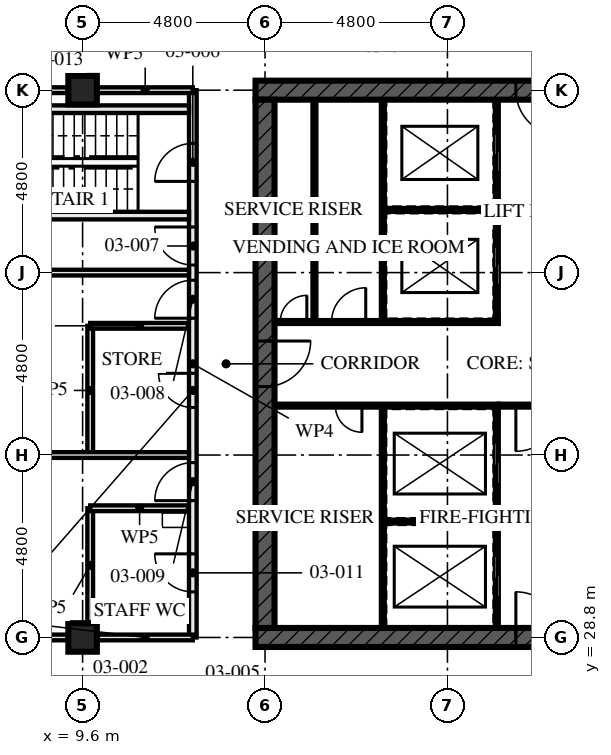
"""IFC4 building model, lengths in metres.
Left out: names, types, materials, properties, quantities, classifications, styles, units other than length and angle.
Written with IfcOpenShell. Run it as: python <this file> out.ifc"""

import sys

from ifc_helpers import new_model, si_unit, direction, frame, frame_2d, origin, origin_2d, place, context, subcontext, project, spatial, rectangle, hollow_rectangle, extrude, element, fill, save


model = new_model("IFC4")
c1 = context("Model", 3, precision=1e-05, world=origin(), true_north=direction((0.0, 1.0)))
c2 = subcontext(c1, "Body", "Model", "MODEL_VIEW")
j1 = project(units=[si_unit("LENGTHUNIT", "METRE"), si_unit("PLANEANGLEUNIT", "RADIAN")], contexts=[c1])
p1 = place(None, origin())
s1 = spatial("IfcSite", under=j1, at=p1, CompositionType="ELEMENT")
p2 = place(p1, origin())
s2 = spatial("IfcBuilding", under=s1, at=p2, CompositionType="ELEMENT")
p3 = place(p2, frame((0.0, 0.0, 13.5)))
s3 = spatial("IfcBuildingStorey", under=s2, at=p3, CompositionType="ELEMENT", Elevation=13.5)
for number, where, z_axis, x_axis in (
    (1, (9.6, 28.8, 0.0), (0.0, 0.0, 1.0), (0.0, 1.0, 0.0)),
    (2, (9.6, 43.2, 0.0), (0.0, 0.0, 1.0), (0.0, 1.0, 0.0)),
):
    element("IfcColumn", number, at=place(p3, frame(where, z_axis=z_axis, x_axis=x_axis)), inside=s3, PredefinedType="COLUMN", context=c2, shape_type="SweptSolid", body=[
        extrude(hollow_rectangle(XDim=0.75, YDim=0.75, WallThickness=0.08, at=origin_2d()), origin(), (0.0, 0.0, 1.0), 4.5),
    ])
p4 = place(p3, frame((14.15, 28.8, -0.17), z_axis=(0.0, 0.0, 1.0), x_axis=(1.0, 0.0, 0.0)))
e3 = element("IfcWall", 3, at=p4, inside=s3, PredefinedType="SHEAR", context=c2, shape_type="SweptSolid", body=[
    extrude(rectangle(XDim=14.9, YDim=0.5, at=frame_2d((7.45, 0.0))), origin(), (0.0, 0.0, 1.0), 4.5),
])
p5 = place(p4, frame((6.85, 0.0, 0.17)))
e4 = element("IfcOpeningElement", 4, at=p5, cuts=e3, PredefinedType="OPENING", context=c2, shape_type="SweptSolid", body=[
    extrude(rectangle(XDim=1.2, YDim=2.1, at=frame_2d((0.6, 1.05))), frame((0.0, 0.26, 0.0), z_axis=(0.0, -1.0, 0.0), x_axis=(1.0, 0.0, 0.0)), (0.0, 0.0, 1.0), 0.521),
])
p6 = place(p3, frame((29.05, 43.2, -0.17), z_axis=(0.0, 0.0, 1.0), x_axis=(-1.0, 0.0, 0.0)))
e5 = element("IfcWall", 5, at=p6, inside=s3, PredefinedType="SHEAR", context=c2, shape_type="SweptSolid", body=[
    extrude(rectangle(XDim=14.9, YDim=0.5, at=frame_2d((7.45, 0.0))), origin(), (0.0, 0.0, 1.0), 4.5),
])
p7 = place(p6, frame((6.85, 0.0, 0.17)))
e6 = element("IfcOpeningElement", 6, at=p7, cuts=e5, PredefinedType="OPENING", context=c2, shape_type="SweptSolid", body=[
    extrude(rectangle(XDim=1.2, YDim=2.1, at=frame_2d((0.6, 1.05))), frame((0.0, 0.26, 0.0), z_axis=(0.0, -1.0, 0.0), x_axis=(1.0, 0.0, 0.0)), (0.0, 0.0, 1.0), 0.521),
])
p8 = place(p3, frame((14.4, 42.95, -0.17), z_axis=(0.0, 0.0, 1.0), x_axis=(0.0, -1.0, 0.0)))
e7 = element("IfcWall", 7, at=p8, inside=s3, PredefinedType="SHEAR", context=c2, shape_type="SweptSolid", body=[
    extrude(rectangle(XDim=13.9, YDim=0.5, at=frame_2d((6.95, 0.0))), origin(), (0.0, 0.0, 1.0), 4.5),
])
p9 = place(p8, frame((6.35, 0.0, 0.17)))
e8 = element("IfcOpeningElement", 8, at=p9, cuts=e7, PredefinedType="OPENING", context=c2, shape_type="SweptSolid", body=[
    extrude(rectangle(XDim=1.2, YDim=2.1, at=frame_2d((0.6, 1.05))), frame((0.0, 0.26, 0.0), z_axis=(0.0, -1.0, 0.0), x_axis=(1.0, 0.0, 0.0)), (0.0, 0.0, 1.0), 0.521),
])
for number, where, z_axis, x_axis in (
    (9, (7.7, 42.7, 0.0), (0.0, 0.0, 1.0), (1.0, 0.0, 0.0)),
    (10, (7.7, 39.9, 0.0), (0.0, 0.0, 1.0), (1.0, 0.0, 0.0)),
):
    element("IfcWall", number, at=place(p3, frame(where, z_axis=z_axis, x_axis=x_axis)), inside=s3, PredefinedType="SOLIDWALL", context=c2, shape_type="SweptSolid", body=[
        extrude(rectangle(XDim=4.7, YDim=0.2, at=frame_2d((2.35, 0.0))), origin(), (0.0, 0.0, 1.0), 3.99),
    ])
p10 = place(p3, frame((9.8, 37.0, 0.0), z_axis=(0.0, 0.0, 1.0), x_axis=(1.0, 0.0, 0.0)))
e11 = element("IfcWall", 11, at=p10, inside=s3, PredefinedType="PARTITIONING", context=c2, shape_type="SweptSolid", body=[
    extrude(rectangle(XDim=2.6, YDim=0.15, at=frame_2d((1.3, 0.0))), origin(), (0.0, 0.0, 1.0), 4.33),
])
p11 = place(p3, frame((9.8, 37.0, 0.0), z_axis=(0.0, 0.0, 1.0), x_axis=(0.0, -1.0, 0.0)))
e12 = element("IfcWall", 12, at=p11, inside=s3, PredefinedType="PARTITIONING", context=c2, shape_type="SweptSolid", body=[
    extrude(rectangle(XDim=3.4, YDim=0.15, at=frame_2d((1.7, 0.0))), origin(), (0.0, 0.0, 1.0), 4.33),
])
p12 = place(p3, frame((9.8, 32.2, 0.0), z_axis=(0.0, 0.0, 1.0), x_axis=(1.0, 0.0, 0.0)))
e13 = element("IfcWall", 13, at=p12, inside=s3, PredefinedType="PARTITIONING", context=c2, shape_type="SweptSolid", body=[
    extrude(rectangle(XDim=2.6, YDim=0.15, at=frame_2d((1.3, 0.0))), origin(), (0.0, 0.0, 1.0), 4.33),
])
p13 = place(p3, frame((9.8, 32.2, 0.0), z_axis=(0.0, 0.0, 1.0), x_axis=(0.0, -1.0, 0.0)))
e14 = element("IfcWall", 14, at=p13, inside=s3, PredefinedType="PARTITIONING", context=c2, shape_type="SweptSolid", body=[
    extrude(rectangle(XDim=3.005, YDim=0.15, at=frame_2d((1.502, 0.0))), origin(), (0.0, 0.0, 1.0), 4.33),
])
for number, where, z_axis, x_axis in (
    (15, (0.395, 38.4, 0.0), (0.0, 0.0, 1.0), (1.0, 0.0, 0.0)),
    (16, (0.395, 33.6, 0.0), (0.0, 0.0, 1.0), (1.0, 0.0, 0.0)),
):
    element("IfcWall", number, at=place(p3, frame(where, z_axis=z_axis, x_axis=x_axis)), inside=s3, PredefinedType="PARTITIONING", context=c2, shape_type="SweptSolid", body=[
        extrude(rectangle(XDim=12.005, YDim=0.15, at=frame_2d((6.002, 0.0))), origin(), (0.0, 0.0, 1.0), 3.55),
    ])
p14 = place(p3, frame((12.5, 43.2, 0.0), z_axis=(0.0, 0.0, 1.0), x_axis=(0.0, -1.0, 0.0)))
e17 = element("IfcWall", 17, at=p14, inside=s3, PredefinedType="PARTITIONING", context=c2, shape_type="SweptSolid", body=[
    extrude(rectangle(XDim=14.4, YDim=0.2, at=frame_2d((7.2, 0.0))), origin(), (0.0, 0.0, 1.0), 3.55),
])
p15 = place(p14, frame((1.4, 0.0, 0.0)))
e18 = element("IfcOpeningElement", 18, at=p15, cuts=e17, PredefinedType="OPENING", context=c2, shape_type="SweptSolid", body=[
    extrude(rectangle(XDim=1.0, YDim=2.1, at=frame_2d((0.5, 1.05))), frame((0.0, 0.111, 0.0), z_axis=(0.0, -1.0, 0.0), x_axis=(1.0, 0.0, 0.0)), (0.0, 0.0, 1.0), 0.221),
])
p16 = place(p14, frame((3.6, 0.0, 0.0)))
e19 = element("IfcOpeningElement", 19, at=p16, cuts=e17, PredefinedType="OPENING", context=c2, shape_type="SweptSolid", body=[
    extrude(rectangle(XDim=1.0, YDim=2.4, at=frame_2d((0.5, 1.2))), frame((0.0, 0.111, 0.0), z_axis=(0.0, -1.0, 0.0), x_axis=(1.0, 0.0, 0.0)), (0.0, 0.0, 1.0), 0.221),
])
p17 = place(p14, frame((5.0, 0.0, 0.0)))
e20 = element("IfcOpeningElement", 20, at=p17, cuts=e17, PredefinedType="OPENING", context=c2, shape_type="SweptSolid", body=[
    extrude(rectangle(XDim=1.0, YDim=2.4, at=frame_2d((0.5, 1.2))), frame((0.0, 0.111, 0.0), z_axis=(0.0, -1.0, 0.0), x_axis=(1.0, 0.0, 0.0)), (0.0, 0.0, 1.0), 0.221),
])
p18 = place(p14, frame((9.8, 0.0, 0.0)))
e21 = element("IfcOpeningElement", 21, at=p18, cuts=e17, PredefinedType="OPENING", context=c2, shape_type="SweptSolid", body=[
    extrude(rectangle(XDim=1.0, YDim=2.4, at=frame_2d((0.5, 1.2))), frame((0.0, 0.111, 0.0), z_axis=(0.0, -1.0, 0.0), x_axis=(1.0, 0.0, 0.0)), (0.0, 0.0, 1.0), 0.221),
])
p19 = place(p14, frame((7.45, 0.0, 0.0)))
e22 = element("IfcOpeningElement", 22, at=p19, cuts=e17, PredefinedType="OPENING", context=c2, shape_type="SweptSolid", body=[
    extrude(rectangle(XDim=0.9, YDim=2.1, at=frame_2d((0.45, 1.05))), frame((0.0, 0.111, 0.0), z_axis=(0.0, -1.0, 0.0), x_axis=(1.0, 0.0, 0.0)), (0.0, 0.0, 1.0), 0.221),
])
p20 = place(p14, frame((12.2, 0.0, 0.0)))
e23 = element("IfcOpeningElement", 23, at=p20, cuts=e17, PredefinedType="OPENING", context=c2, shape_type="SweptSolid", body=[
    extrude(rectangle(XDim=1.0, YDim=2.1, at=frame_2d((0.5, 1.05))), frame((0.0, 0.111, 0.0), z_axis=(0.0, -1.0, 0.0), x_axis=(1.0, 0.0, 0.0)), (0.0, 0.0, 1.0), 0.221),
])
p21 = place(p3, frame((15.7, 37.15, 0.0), z_axis=(0.0, 0.0, 1.0), x_axis=(0.0, 1.0, 0.0)))
e24 = element("IfcWall", 24, at=p21, inside=s3, PredefinedType="SOLIDWALL", context=c2, shape_type="SweptSolid", body=[
    extrude(rectangle(XDim=5.8, YDim=0.1, at=frame_2d((2.9, 0.0))), origin(), (0.0, 0.0, 1.0), 4.33),
])
p22 = place(p3, frame((20.5, 29.05, 0.0), z_axis=(0.0, 0.0, 1.0), x_axis=(0.0, 1.0, 0.0)))
e25 = element("IfcWall", 25, at=p22, inside=s3, PredefinedType="SOLIDWALL", context=c2, shape_type="SweptSolid", body=[
    extrude(rectangle(XDim=5.8, YDim=0.1, at=frame_2d((2.9, 0.0))), origin(), (0.0, 0.0, 1.0), 4.33),
])
p23 = place(p22, frame((0.8, 0.0, 0.0)))
e26 = element("IfcOpeningElement", 26, at=p23, cuts=e25, PredefinedType="OPENING", context=c2, shape_type="SweptSolid", body=[
    extrude(rectangle(XDim=1.1, YDim=2.3, at=frame_2d((0.55, 1.15))), frame((0.0, 0.061, 0.0), z_axis=(0.0, -1.0, 0.0), x_axis=(1.0, 0.0, 0.0)), (0.0, 0.0, 1.0), 0.121),
])
p24 = place(p22, frame((3.775, 0.0, 0.0)))
e27 = element("IfcOpeningElement", 27, at=p24, cuts=e25, PredefinedType="OPENING", context=c2, shape_type="SweptSolid", body=[
    extrude(rectangle(XDim=1.1, YDim=2.3, at=frame_2d((0.55, 1.15))), frame((0.0, 0.061, 0.0), z_axis=(0.0, -1.0, 0.0), x_axis=(1.0, 0.0, 0.0)), (0.0, 0.0, 1.0), 0.121),
])
p25 = place(p3, frame((20.5, 37.15, 0.0), z_axis=(0.0, 0.0, 1.0), x_axis=(0.0, 1.0, 0.0)))
e28 = element("IfcWall", 28, at=p25, inside=s3, PredefinedType="SOLIDWALL", context=c2, shape_type="SweptSolid", body=[
    extrude(rectangle(XDim=5.8, YDim=0.1, at=frame_2d((2.9, 0.0))), origin(), (0.0, 0.0, 1.0), 4.33),
])
p26 = place(p25, frame((0.925, 0.0, 0.0)))
e29 = element("IfcOpeningElement", 29, at=p26, cuts=e28, PredefinedType="OPENING", context=c2, shape_type="SweptSolid", body=[
    extrude(rectangle(XDim=1.0, YDim=2.1, at=frame_2d((0.5, 1.05))), frame((0.0, 0.061, 0.0), z_axis=(0.0, -1.0, 0.0), x_axis=(1.0, 0.0, 0.0)), (0.0, 0.0, 1.0), 0.121),
])
p27 = place(p25, frame((3.9, 0.0, 0.0)))
e30 = element("IfcOpeningElement", 30, at=p27, cuts=e28, PredefinedType="OPENING", context=c2, shape_type="SweptSolid", body=[
    extrude(rectangle(XDim=1.0, YDim=2.1, at=frame_2d((0.5, 1.05))), frame((0.0, 0.061, 0.0), z_axis=(0.0, -1.0, 0.0), x_axis=(1.0, 0.0, 0.0)), (0.0, 0.0, 1.0), 0.121),
])
p28 = place(p3, frame((14.65, 34.9, 0.0), z_axis=(0.0, 0.0, 1.0), x_axis=(1.0, 0.0, 0.0)))
e31 = element("IfcWall", 31, at=p28, inside=s3, PredefinedType="SOLIDWALL", context=c2, shape_type="SweptSolid", body=[
    extrude(rectangle(XDim=5.9, YDim=0.1, at=frame_2d((2.95, 0.0))), origin(), (0.0, 0.0, 1.0), 4.33),
])
p29 = place(p28, frame((1.6, 0.0, 0.0)))
e32 = element("IfcOpeningElement", 32, at=p29, cuts=e31, PredefinedType="OPENING", context=c2, shape_type="SweptSolid", body=[
    extrude(rectangle(XDim=0.7, YDim=2.1, at=frame_2d((0.35, 1.05))), frame((0.0, 0.061, 0.0), z_axis=(0.0, -1.0, 0.0), x_axis=(1.0, 0.0, 0.0)), (0.0, 0.0, 1.0), 0.121),
])
p30 = place(p3, frame((14.65, 37.1, 0.0), z_axis=(0.0, 0.0, 1.0), x_axis=(1.0, 0.0, 0.0)))
e33 = element("IfcWall", 33, at=p30, inside=s3, PredefinedType="SOLIDWALL", context=c2, shape_type="SweptSolid", body=[
    extrude(rectangle(XDim=5.9, YDim=0.1, at=frame_2d((2.95, 0.0))), origin(), (0.0, 0.0, 1.0), 4.33),
])
p31 = place(p30, frame((0.15, 0.0, 0.0)))
e34 = element("IfcOpeningElement", 34, at=p31, cuts=e33, PredefinedType="OPENING", context=c2, shape_type="SweptSolid", body=[
    extrude(rectangle(XDim=0.7, YDim=2.1, at=frame_2d((0.35, 1.05))), frame((0.0, 0.061, 0.0), z_axis=(0.0, -1.0, 0.0), x_axis=(1.0, 0.0, 0.0)), (0.0, 0.0, 1.0), 0.121),
])
p32 = place(p30, frame((1.5, 0.0, 0.0)))
e35 = element("IfcOpeningElement", 35, at=p32, cuts=e33, PredefinedType="OPENING", context=c2, shape_type="SweptSolid", body=[
    extrude(rectangle(XDim=0.9, YDim=2.1, at=frame_2d((0.45, 1.05))), frame((0.0, 0.061, 0.0), z_axis=(0.0, -1.0, 0.0), x_axis=(1.0, 0.0, 0.0)), (0.0, 0.0, 1.0), 0.121),
])
p33 = place(p3, frame((20.55, 34.9, 0.0), z_axis=(0.0, 0.0, 1.0), x_axis=(1.0, 0.0, 0.0)))
e36 = element("IfcWall", 36, at=p33, inside=s3, PredefinedType="SOLIDWALL", context=c2, shape_type="SweptSolid", body=[
    extrude(rectangle(XDim=2.5, YDim=0.1, at=frame_2d((1.25, 0.0))), origin(), (0.0, 0.0, 1.0), 4.33),
])
p34 = place(p33, frame((0.45, 0.0, 0.0)))
e37 = element("IfcOpeningElement", 37, at=p34, cuts=e36, PredefinedType="OPENING", context=c2, shape_type="SweptSolid", body=[
    extrude(rectangle(XDim=1.2, YDim=2.1, at=frame_2d((0.6, 1.05))), frame((0.0, 0.061, 0.0), z_axis=(0.0, -1.0, 0.0), x_axis=(1.0, 0.0, 0.0)), (0.0, 0.0, 1.0), 0.121),
])
p35 = place(p3, frame((17.5, 29.05, 0.0), z_axis=(0.0, 0.0, 1.0), x_axis=(0.0, 1.0, 0.0)))
e38 = element("IfcWall", 38, at=p35, inside=s3, PredefinedType="SOLIDWALL", context=c2, shape_type="SweptSolid", body=[
    extrude(rectangle(XDim=5.8, YDim=0.1, at=frame_2d((2.9, 0.0))), origin(), (0.0, 0.0, 1.0), 4.33),
])
p36 = place(p3, frame((17.55, 31.85, 0.0), z_axis=(0.0, 0.0, 1.0), x_axis=(1.0, 0.0, 0.0)))
e39 = element("IfcWall", 39, at=p36, inside=s3, PredefinedType="SOLIDWALL", context=c2, shape_type="SweptSolid", body=[
    extrude(rectangle(XDim=2.9, YDim=0.1, at=frame_2d((1.45, 0.0))), origin(), (0.0, 0.0, 1.0), 4.33),
])
p37 = place(p3, frame((17.5, 37.15, 0.0), z_axis=(0.0, 0.0, 1.0), x_axis=(0.0, 1.0, 0.0)))
e40 = element("IfcWall", 40, at=p37, inside=s3, PredefinedType="SOLIDWALL", context=c2, shape_type="SweptSolid", body=[
    extrude(rectangle(XDim=5.8, YDim=0.1, at=frame_2d((2.9, 0.0))), origin(), (0.0, 0.0, 1.0), 4.33),
])
p38 = place(p3, frame((17.55, 40.05, 0.0), z_axis=(0.0, 0.0, 1.0), x_axis=(1.0, 0.0, 0.0)))
e41 = element("IfcWall", 41, at=p38, inside=s3, PredefinedType="SOLIDWALL", context=c2, shape_type="SweptSolid", body=[
    extrude(rectangle(XDim=2.9, YDim=0.1, at=frame_2d((1.45, 0.0))), origin(), (0.0, 0.0, 1.0), 4.33),
])
p39 = place(p3, frame((12.5, 28.8, 0.0), z_axis=(0.0, 0.0, 1.0), x_axis=(-1.0, 0.0, 0.0)))
e42 = element("IfcWall", 42, at=p39, inside=s3, PredefinedType="PARTITIONING", context=c2, shape_type="SweptSolid", body=[
    extrude(rectangle(XDim=2.505, YDim=0.15, at=frame_2d((1.252, 0.0))), origin(), (0.0, 0.0, 1.0), 3.32),
])
p40 = place(p3, frame((9.205, 28.8, 0.0), z_axis=(0.0, 0.0, 1.0), x_axis=(-1.0, 0.0, 0.0)))
e43 = element("IfcWall", 43, at=p40, inside=s3, PredefinedType="PARTITIONING", context=c2, shape_type="SweptSolid", body=[
    extrude(rectangle(XDim=4.01, YDim=0.15, at=frame_2d((2.005, 0.0))), origin(), (0.0, 0.0, 1.0), 3.32),
])
p41 = place(p3, frame((12.5, 43.2, 0.0), z_axis=(0.0, 0.0, 1.0), x_axis=(-1.0, 0.0, 0.0)))
e44 = element("IfcWall", 44, at=p41, inside=s3, PredefinedType="PARTITIONING", context=c2, shape_type="SweptSolid", body=[
    extrude(rectangle(XDim=2.505, YDim=0.15, at=frame_2d((1.252, 0.0))), origin(), (0.0, 0.0, 1.0), 3.32),
])
p42 = place(p3, frame((9.205, 43.2, 0.0), z_axis=(0.0, 0.0, 1.0), x_axis=(-1.0, 0.0, 0.0)))
e45 = element("IfcWall", 45, at=p42, inside=s3, PredefinedType="PARTITIONING", context=c2, shape_type="SweptSolid", body=[
    extrude(rectangle(XDim=4.01, YDim=0.15, at=frame_2d((2.005, 0.0))), origin(), (0.0, 0.0, 1.0), 3.32),
])
p43 = place(p15, frame((1.0, 0.0, 0.0), z_axis=(0.0, 0.0, 1.0), x_axis=(-1.0, 0.0, 0.0)))
e46 = element("IfcDoor", 46, at=p43, inside=s3, OperationType="SINGLE_SWING_RIGHT", PredefinedType="DOOR", context=c2, shape_type="SweptSolid", body=[
    extrude(rectangle(XDim=1.0, YDim=2.1, at=frame_2d((0.5, 1.05))), frame((0.0, 0.032, 0.0), z_axis=(0.0, -1.0, 0.0), x_axis=(1.0, 0.0, 0.0)), (0.0, 0.0, 1.0), 0.064),
])
fill(e18, e46)
p44 = place(p16, frame((1.0, 0.0, 0.0), z_axis=(0.0, 0.0, 1.0), x_axis=(-1.0, 0.0, 0.0)))
e47 = element("IfcDoor", 47, at=p44, inside=s3, OperationType="SINGLE_SWING_LEFT", PredefinedType="DOOR", context=c2, shape_type="SweptSolid", body=[
    extrude(rectangle(XDim=1.0, YDim=2.4, at=frame_2d((0.5, 1.2))), frame((0.0, 0.027, 0.0), z_axis=(0.0, -1.0, 0.0), x_axis=(1.0, 0.0, 0.0)), (0.0, 0.0, 1.0), 0.054),
])
fill(e19, e47)
p45 = place(p17, frame((1.0, 0.0, 0.0), z_axis=(0.0, 0.0, 1.0), x_axis=(-1.0, 0.0, 0.0)))
e48 = element("IfcDoor", 48, at=p45, inside=s3, OperationType="SINGLE_SWING_RIGHT", PredefinedType="DOOR", context=c2, shape_type="SweptSolid", body=[
    extrude(rectangle(XDim=1.0, YDim=2.4, at=frame_2d((0.5, 1.2))), frame((0.0, 0.027, 0.0), z_axis=(0.0, -1.0, 0.0), x_axis=(1.0, 0.0, 0.0)), (0.0, 0.0, 1.0), 0.054),
])
fill(e20, e48)
p46 = place(p18, frame((1.0, 0.0, 0.0), z_axis=(0.0, 0.0, 1.0), x_axis=(-1.0, 0.0, 0.0)))
e49 = element("IfcDoor", 49, at=p46, inside=s3, OperationType="SINGLE_SWING_RIGHT", PredefinedType="DOOR", context=c2, shape_type="SweptSolid", body=[
    extrude(rectangle(XDim=1.0, YDim=2.4, at=frame_2d((0.5, 1.2))), frame((0.0, 0.027, 0.0), z_axis=(0.0, -1.0, 0.0), x_axis=(1.0, 0.0, 0.0)), (0.0, 0.0, 1.0), 0.054),
])
fill(e21, e49)
p47 = place(p19, frame((0.9, 0.0, 0.0), z_axis=(0.0, 0.0, 1.0), x_axis=(-1.0, 0.0, 0.0)))
e50 = element("IfcDoor", 50, at=p47, inside=s3, OperationType="SINGLE_SWING_LEFT", PredefinedType="DOOR", context=c2, shape_type="SweptSolid", body=[
    extrude(rectangle(XDim=0.9, YDim=2.1, at=frame_2d((0.45, 1.05))), frame((0.0, 0.027, 0.0), z_axis=(0.0, -1.0, 0.0), x_axis=(1.0, 0.0, 0.0)), (0.0, 0.0, 1.0), 0.054),
])
fill(e22, e50)
p48 = place(p20, frame((1.0, 0.0, 0.0), z_axis=(0.0, 0.0, 1.0), x_axis=(-1.0, 0.0, 0.0)))
e51 = element("IfcDoor", 51, at=p48, inside=s3, OperationType="SINGLE_SWING_LEFT", PredefinedType="DOOR", context=c2, shape_type="SweptSolid", body=[
    extrude(rectangle(XDim=1.0, YDim=2.1, at=frame_2d((0.5, 1.05))), frame((0.0, 0.027, 0.0), z_axis=(0.0, -1.0, 0.0), x_axis=(1.0, 0.0, 0.0)), (0.0, 0.0, 1.0), 0.054),
])
fill(e23, e51)
p49 = place(p23, origin())
e52 = element("IfcDoor", 52, at=p49, inside=s3, OperationType="SLIDING_TO_LEFT", PredefinedType="DOOR", context=c2, shape_type="SweptSolid", body=[
    extrude(rectangle(XDim=1.1, YDim=2.3, at=frame_2d((0.55, 1.15))), frame((0.0, 0.05, 0.0), z_axis=(0.0, -1.0, 0.0), x_axis=(1.0, 0.0, 0.0)), (0.0, 0.0, 1.0), 0.1),
])
fill(e26, e52)
p50 = place(p24, origin())
e53 = element("IfcDoor", 53, at=p50, inside=s3, OperationType="SLIDING_TO_LEFT", PredefinedType="DOOR", context=c2, shape_type="SweptSolid", body=[
    extrude(rectangle(XDim=1.1, YDim=2.3, at=frame_2d((0.55, 1.15))), frame((0.0, 0.05, 0.0), z_axis=(0.0, -1.0, 0.0), x_axis=(1.0, 0.0, 0.0)), (0.0, 0.0, 1.0), 0.1),
])
fill(e27, e53)
p51 = place(p26, origin())
e54 = element("IfcDoor", 54, at=p51, inside=s3, OperationType="SLIDING_TO_LEFT", PredefinedType="DOOR", context=c2, shape_type="SweptSolid", body=[
    extrude(rectangle(XDim=1.0, YDim=2.1, at=frame_2d((0.5, 1.05))), frame((0.0, 0.05, 0.0), z_axis=(0.0, -1.0, 0.0), x_axis=(1.0, 0.0, 0.0)), (0.0, 0.0, 1.0), 0.1),
])
fill(e29, e54)
p52 = place(p27, origin())
e55 = element("IfcDoor", 55, at=p52, inside=s3, OperationType="SLIDING_TO_LEFT", PredefinedType="DOOR", context=c2, shape_type="SweptSolid", body=[
    extrude(rectangle(XDim=1.0, YDim=2.1, at=frame_2d((0.5, 1.05))), frame((0.0, 0.05, 0.0), z_axis=(0.0, -1.0, 0.0), x_axis=(1.0, 0.0, 0.0)), (0.0, 0.0, 1.0), 0.1),
])
fill(e30, e55)
p53 = place(p29, frame((0.7, 0.0, 0.0), z_axis=(0.0, 0.0, 1.0), x_axis=(-1.0, 0.0, 0.0)))
e56 = element("IfcDoor", 56, at=p53, inside=s3, OperationType="SINGLE_SWING_RIGHT", PredefinedType="DOOR", context=c2, shape_type="SweptSolid", body=[
    extrude(rectangle(XDim=0.7, YDim=2.1, at=frame_2d((0.35, 1.05))), frame((0.0, 0.027, 0.0), z_axis=(0.0, -1.0, 0.0), x_axis=(1.0, 0.0, 0.0)), (0.0, 0.0, 1.0), 0.054),
])
fill(e32, e56)
p54 = place(p31, origin())
e57 = element("IfcDoor", 57, at=p54, inside=s3, OperationType="SINGLE_SWING_LEFT", PredefinedType="DOOR", context=c2, shape_type="SweptSolid", body=[
    extrude(rectangle(XDim=0.7, YDim=2.1, at=frame_2d((0.35, 1.05))), frame((0.0, 0.027, 0.0), z_axis=(0.0, -1.0, 0.0), x_axis=(1.0, 0.0, 0.0)), (0.0, 0.0, 1.0), 0.054),
])
fill(e34, e57)
p55 = place(p32, origin())
e58 = element("IfcDoor", 58, at=p55, inside=s3, OperationType="SINGLE_SWING_LEFT", PredefinedType="DOOR", context=c2, shape_type="SweptSolid", body=[
    extrude(rectangle(XDim=0.9, YDim=2.1, at=frame_2d((0.45, 1.05))), frame((0.0, 0.027, 0.0), z_axis=(0.0, -1.0, 0.0), x_axis=(1.0, 0.0, 0.0)), (0.0, 0.0, 1.0), 0.054),
])
fill(e35, e58)
p56 = place(p34, frame((1.2, 0.0, 0.0), z_axis=(0.0, 0.0, 1.0), x_axis=(-1.0, 0.0, 0.0)))
e59 = element("IfcDoor", 59, at=p56, inside=s3, OperationType="SINGLE_SWING_LEFT", PredefinedType="DOOR", context=c2, shape_type="SweptSolid", body=[
    extrude(rectangle(XDim=1.2, YDim=2.1, at=frame_2d((0.6, 1.05))), frame((0.0, 0.027, 0.0), z_axis=(0.0, -1.0, 0.0), x_axis=(1.0, 0.0, 0.0)), (0.0, 0.0, 1.0), 0.054),
])
fill(e37, e59)
p57 = place(p5, origin())
e60 = element("IfcDoor", 60, at=p57, inside=s3, OperationType="SINGLE_SWING_LEFT", PredefinedType="DOOR", context=c2, shape_type="SweptSolid", body=[
    extrude(rectangle(XDim=1.2, YDim=2.1, at=frame_2d((0.6, 1.05))), frame((0.0, 0.027, 0.0), z_axis=(0.0, -1.0, 0.0), x_axis=(1.0, 0.0, 0.0)), (0.0, 0.0, 1.0), 0.054),
])
fill(e4, e60)
p58 = place(p9, origin())
e61 = element("IfcDoor", 61, at=p58, inside=s3, OperationType="SINGLE_SWING_LEFT", PredefinedType="DOOR", context=c2, shape_type="SweptSolid", body=[
    extrude(rectangle(XDim=1.2, YDim=2.1, at=frame_2d((0.6, 1.05))), frame((0.0, 0.027, 0.0), z_axis=(0.0, -1.0, 0.0), x_axis=(1.0, 0.0, 0.0)), (0.0, 0.0, 1.0), 0.054),
])
fill(e8, e61)
p59 = place(p7, origin())
e62 = element("IfcDoor", 62, at=p59, inside=s3, OperationType="SINGLE_SWING_LEFT", PredefinedType="DOOR", context=c2, shape_type="SweptSolid", body=[
    extrude(rectangle(XDim=1.2, YDim=2.1, at=frame_2d((0.6, 1.05))), frame((0.0, 0.027, 0.0), z_axis=(0.0, -1.0, 0.0), x_axis=(1.0, 0.0, 0.0)), (0.0, 0.0, 1.0), 0.054),
])
fill(e6, e62)
save(model, sys.argv[1])
